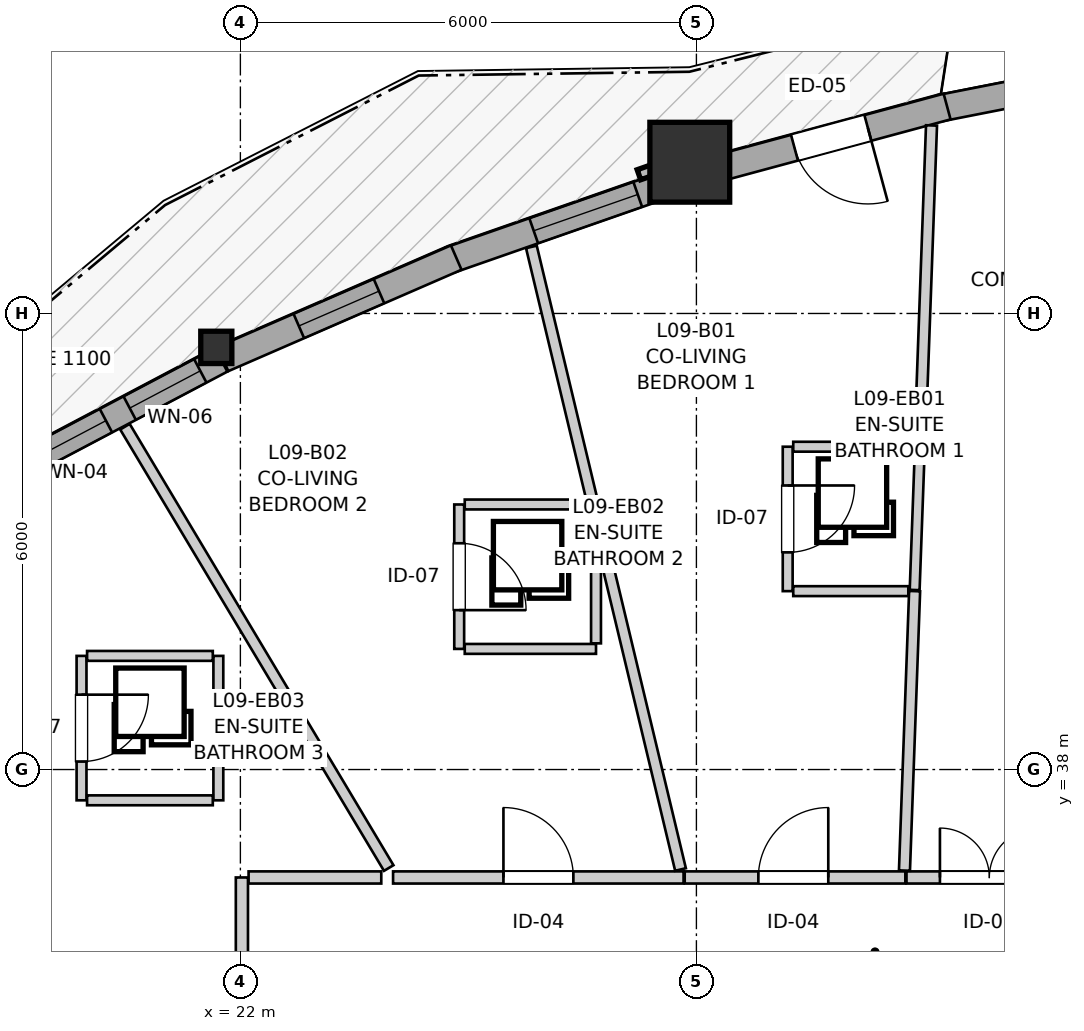
"""IFC4 building model, lengths in metres.
Left out: names, types, materials, properties, quantities, classifications, styles, units other than length and angle.
Written with IfcOpenShell. Run it as: python <this file> out.ifc"""

import sys

from ifc_helpers import new_model, si_unit, direction, frame, frame_2d, origin, origin_2d, place, context, subcontext, project, spatial, rectangle, i_section, extrude, source, transform, mapped, element, fill, save


model = new_model("IFC4")
c1 = context("Model", 3, precision=1e-05, world=origin(), true_north=direction((0.0, 1.0)))
c2 = subcontext(c1, "Body", "Model", "MODEL_VIEW")
j1 = project(units=[si_unit("LENGTHUNIT", "METRE"), si_unit("PLANEANGLEUNIT", "RADIAN")], contexts=[c1])
p1 = place(None, origin())
s1 = spatial("IfcSite", under=j1, at=p1, CompositionType="ELEMENT")
p2 = place(p1, origin())
s2 = spatial("IfcBuilding", under=s1, at=p2, CompositionType="ELEMENT")
p3 = place(p2, frame((0.0, 0.0, 33.4)))
s3 = spatial("IfcBuildingStorey", under=s2, at=p3, CompositionType="ELEMENT", Elevation=33.4)
m1 = source(origin(), c2, "Body", "SweptSolid", [
    extrude(rectangle(XDim=1.05, YDim=1.05, at=origin_2d()), origin(), (0.0, 0.0, 1.0), 2.94),
])
p4 = place(p3, frame((27.913, 45.99, 0.0), z_axis=(0.0, 0.0, 1.0), x_axis=(1.0, 0.0, 0.0)))
e1 = element("IfcColumn", 1, at=p4, inside=s3, PredefinedType="COLUMN", context=c2, shape_type="MappedRepresentation", body=[
    mapped(m1, transform((0.0, 0.0, 0.0), x_axis=(1.0, 0.0, 0.0), y_axis=(0.0, 1.0, 0.0), z_axis=(0.0, 0.0, 1.0), scale=1.0)),
])
m2 = source(origin(), c2, "Body", "SweptSolid", [
    extrude(i_section(OverallWidth=0.409, OverallDepth=0.425, WebThickness=0.03, FlangeThickness=0.048, FilletRadius=0.015, at=origin_2d()), origin(), (0.0, 0.0, 1.0), 2.94),
])
p5 = place(p3, frame((21.683, 43.554, 0.0), z_axis=(0.0, 0.0, 1.0), x_axis=(1.0, 0.0, 0.0)))
e2 = element("IfcColumn", 2, at=p5, inside=s3, PredefinedType="PILASTER", context=c2, shape_type="MappedRepresentation", body=[
    mapped(m2, transform((0.0, 0.0, 0.0), x_axis=(1.0, 0.0, 0.0), y_axis=(0.0, 1.0, 0.0), z_axis=(0.0, 0.0, 1.0), scale=1.0)),
])
p6 = place(p3, frame((34.659, 47.38, 0.0), z_axis=(0.0, 0.0, 1.0), x_axis=(-0.981222284826, -0.19288034571, 0.0)))
e3 = element("IfcWall", 3, at=p6, inside=s3, PredefinedType="SOLIDWALL", context=c2, shape_type="SweptSolid", body=[
    extrude(rectangle(XDim=3.512, YDim=0.35, at=frame_2d((1.756, 0.0))), origin(), (0.0, 0.0, 1.0), 2.42),
])
p7 = place(p6, frame((1.021, 0.0, 0.82)))
e4 = element("IfcOpeningElement", 4, at=p7, cuts=e3, PredefinedType="OPENING", context=c2, shape_type="SweptSolid", body=[
    extrude(rectangle(XDim=1.45, YDim=1.25, at=frame_2d((0.725, 0.625))), frame((0.0, 0.185, 0.0), z_axis=(0.0, -1.0, 0.0), x_axis=(1.0, 0.0, 0.0)), (0.0, 0.0, 1.0), 0.37),
])
p8 = place(p3, frame((31.298, 46.722, 0.0), z_axis=(0.0, 0.0, 1.0), x_axis=(-0.965455913242, -0.260566459057, 0.0)))
e5 = element("IfcWall", 5, at=p8, inside=s3, PredefinedType="SOLIDWALL", context=c2, shape_type="SweptSolid", body=[
    extrude(rectangle(XDim=3.159, YDim=0.35, at=frame_2d((1.58, 0.0))), origin(), (0.0, 0.0, 1.0), 2.42),
])
p9 = place(p8, frame((1.08, 0.0, 0.0)))
e6 = element("IfcOpeningElement", 6, at=p9, cuts=e5, PredefinedType="OPENING", context=c2, shape_type="SweptSolid", body=[
    extrude(rectangle(XDim=1.0, YDim=2.1, at=frame_2d((0.5, 1.05))), frame((0.0, 0.185, 0.0), z_axis=(0.0, -1.0, 0.0), x_axis=(1.0, 0.0, 0.0)), (0.0, 0.0, 1.0), 0.37),
])
p10 = place(p3, frame((27.687, 45.726, 0.0), z_axis=(0.0, 0.0, 1.0), x_axis=(-0.9441205041, -0.329600475936, 0.0)))
e7 = element("IfcWall", 7, at=p10, inside=s3, PredefinedType="SOLIDWALL", context=c2, shape_type="SweptSolid", body=[
    extrude(rectangle(XDim=3.104, YDim=0.35, at=frame_2d((1.552, 0.0))), origin(), (0.0, 0.0, 1.0), 2.42),
])
p11 = place(p10, frame((0.486, 0.0, 0.82)))
e8 = element("IfcOpeningElement", 8, at=p11, cuts=e7, PredefinedType="OPENING", context=c2, shape_type="SweptSolid", body=[
    extrude(rectangle(XDim=1.45, YDim=1.25, at=frame_2d((0.725, 0.625))), frame((0.0, 0.185, 0.0), z_axis=(0.0, -1.0, 0.0), x_axis=(1.0, 0.0, 0.0)), (0.0, 0.0, 1.0), 0.37),
])
p12 = place(p3, frame((24.84, 44.735, 0.0), z_axis=(0.0, 0.0, 1.0), x_axis=(-0.917090935142, -0.398678086532, 0.0)))
e9 = element("IfcWall", 9, at=p12, inside=s3, PredefinedType="SOLIDWALL", context=c2, shape_type="SweptSolid", body=[
    extrude(rectangle(XDim=3.346, YDim=0.35, at=frame_2d((1.673, 0.0))), origin(), (0.0, 0.0, 1.0), 2.42),
])
p13 = place(p12, frame((1.108, 0.0, 0.82)))
e10 = element("IfcOpeningElement", 10, at=p13, cuts=e9, PredefinedType="OPENING", context=c2, shape_type="SweptSolid", body=[
    extrude(rectangle(XDim=1.15, YDim=1.2, at=frame_2d((0.575, 0.6))), frame((0.0, 0.185, 0.0), z_axis=(0.0, -1.0, 0.0), x_axis=(1.0, 0.0, 0.0)), (0.0, 0.0, 1.0), 0.37),
])
p14 = place(p3, frame((21.747, 43.39, 0.0), z_axis=(0.0, 0.0, 1.0), x_axis=(-0.88437802144, -0.46677137358, 0.0)))
e11 = element("IfcWall", 11, at=p14, inside=s3, PredefinedType="SOLIDWALL", context=c2, shape_type="SweptSolid", body=[
    extrude(rectangle(XDim=3.327, YDim=0.35, at=frame_2d((1.664, 0.0))), origin(), (0.0, 0.0, 1.0), 2.42),
])
p15 = place(p14, frame((0.311, 0.0, 0.82)))
e12 = element("IfcOpeningElement", 12, at=p15, cuts=e11, PredefinedType="OPENING", context=c2, shape_type="SweptSolid", body=[
    extrude(rectangle(XDim=1.05, YDim=1.45, at=frame_2d((0.525, 0.725))), frame((0.0, 0.185, 0.0), z_axis=(0.0, -1.0, 0.0), x_axis=(1.0, 0.0, 0.0)), (0.0, 0.0, 1.0), 0.37),
])
p16 = place(p14, frame((1.714, 0.0, 0.82)))
e13 = element("IfcOpeningElement", 13, at=p16, cuts=e11, PredefinedType="OPENING", context=c2, shape_type="SweptSolid", body=[
    extrude(rectangle(XDim=1.35, YDim=1.45, at=frame_2d((0.675, 0.725))), frame((0.0, 0.185, 0.0), z_axis=(0.0, -1.0, 0.0), x_axis=(1.0, 0.0, 0.0)), (0.0, 0.0, 1.0), 0.37),
])
p17 = place(p3, frame((22.02, 32.71, 0.0), z_axis=(0.0, 0.0, 1.0), x_axis=(0.0, 1.0, 0.0)))
e14 = element("IfcWall", 14, at=p17, inside=s3, PredefinedType="PARTITIONING", context=c2, shape_type="SweptSolid", body=[
    extrude(rectangle(XDim=3.87, YDim=0.16, at=frame_2d((1.935, 0.0))), origin(), (0.0, 0.0, 1.0), 2.94),
])
p18 = place(p17, frame((1.485, 0.0, 0.0)))
e15 = element("IfcOpeningElement", 15, at=p18, cuts=e14, PredefinedType="OPENING", context=c2, shape_type="SweptSolid", body=[
    extrude(rectangle(XDim=0.92, YDim=2.1, at=frame_2d((0.46, 1.05))), frame((0.0, 0.09, 0.0), z_axis=(0.0, -1.0, 0.0), x_axis=(1.0, 0.0, 0.0)), (0.0, 0.0, 1.0), 0.18),
])
p19 = place(p3, frame((24.009, 36.58, 0.0), z_axis=(0.0, 0.0, 1.0), x_axis=(1.0, 0.0, 0.0)))
e16 = element("IfcWall", 16, at=p19, inside=s3, PredefinedType="PARTITIONING", context=c2, shape_type="SweptSolid", body=[
    extrude(rectangle(XDim=3.822, YDim=0.16, at=frame_2d((1.911, 0.0))), origin(), (0.0, 0.0, 1.0), 2.548),
])
p20 = place(p19, frame((1.452, 0.0, 0.0)))
e17 = element("IfcOpeningElement", 17, at=p20, cuts=e16, PredefinedType="OPENING", context=c2, shape_type="SweptSolid", body=[
    extrude(rectangle(XDim=0.92, YDim=2.1, at=frame_2d((0.46, 1.05))), frame((0.0, 0.09, 0.0), z_axis=(0.0, -1.0, 0.0), x_axis=(1.0, 0.0, 0.0)), (0.0, 0.0, 1.0), 0.18),
])
p21 = place(p3, frame((27.846, 36.58, 0.0), z_axis=(0.0, 0.0, 1.0), x_axis=(1.0, 0.0, 0.0)))
e18 = element("IfcWall", 18, at=p21, inside=s3, PredefinedType="PARTITIONING", context=c2, shape_type="SweptSolid", body=[
    extrude(rectangle(XDim=2.903, YDim=0.16, at=frame_2d((1.452, 0.0))), origin(), (0.0, 0.0, 1.0), 2.94),
])
p22 = place(p21, frame((0.969, 0.0, 0.0)))
e19 = element("IfcOpeningElement", 19, at=p22, cuts=e18, PredefinedType="OPENING", context=c2, shape_type="SweptSolid", body=[
    extrude(rectangle(XDim=0.92, YDim=2.1, at=frame_2d((0.46, 1.05))), frame((0.0, 0.09, 0.0), z_axis=(0.0, -1.0, 0.0), x_axis=(1.0, 0.0, 0.0)), (0.0, 0.0, 1.0), 0.18),
])
p23 = place(p3, frame((30.764, 36.58, 0.0), z_axis=(0.0, 0.0, 1.0), x_axis=(1.0, 0.0, 0.0)))
e20 = element("IfcWall", 20, at=p23, inside=s3, PredefinedType="PARTITIONING", context=c2, shape_type="SweptSolid", body=[
    extrude(rectangle(XDim=2.225, YDim=0.16, at=frame_2d((1.113, 0.0))), origin(), (0.0, 0.0, 1.0), 2.94),
])
p24 = place(p23, frame((0.44, 0.0, 0.0)))
e21 = element("IfcOpeningElement", 21, at=p24, cuts=e20, PredefinedType="OPENING", context=c2, shape_type="SweptSolid", body=[
    extrude(rectangle(XDim=1.3, YDim=2.1, at=frame_2d((0.65, 1.05))), frame((0.0, 0.09, 0.0), z_axis=(0.0, -1.0, 0.0), x_axis=(1.0, 0.0, 0.0)), (0.0, 0.0, 1.0), 0.18),
])
p25 = place(p3, frame((29.201, 42.247, 0.0), z_axis=(0.0, 0.0, 1.0), x_axis=(0.0, -1.0, 0.0)))
e22 = element("IfcWall", 22, at=p25, inside=s3, PredefinedType="PARTITIONING", context=c2, shape_type="SweptSolid", body=[
    extrude(rectangle(XDim=1.9, YDim=0.13, at=frame_2d((0.95, 0.0))), origin(), (0.0, 0.0, 1.0), 2.94),
])
p26 = place(p25, frame((0.51, 0.0, 0.0)))
e23 = element("IfcOpeningElement", 23, at=p26, cuts=e22, PredefinedType="OPENING", context=c2, shape_type="SweptSolid", body=[
    extrude(rectangle(XDim=0.88, YDim=2.05, at=frame_2d((0.44, 1.025))), frame((0.0, 0.075, 0.0), z_axis=(0.0, -1.0, 0.0), x_axis=(1.0, 0.0, 0.0)), (0.0, 0.0, 1.0), 0.15),
])
p27 = place(p3, frame((24.879, 41.487, 0.0), z_axis=(0.0, 0.0, 1.0), x_axis=(0.0, -1.0, 0.0)))
e24 = element("IfcWall", 24, at=p27, inside=s3, PredefinedType="PARTITIONING", context=c2, shape_type="SweptSolid", body=[
    extrude(rectangle(XDim=1.9, YDim=0.13, at=frame_2d((0.95, 0.0))), origin(), (0.0, 0.0, 1.0), 2.94),
])
p28 = place(p27, frame((0.51, 0.0, 0.0)))
e25 = element("IfcOpeningElement", 25, at=p28, cuts=e24, PredefinedType="OPENING", context=c2, shape_type="SweptSolid", body=[
    extrude(rectangle(XDim=0.88, YDim=2.05, at=frame_2d((0.44, 1.025))), frame((0.0, 0.075, 0.0), z_axis=(0.0, -1.0, 0.0), x_axis=(1.0, 0.0, 0.0)), (0.0, 0.0, 1.0), 0.15),
])
p29 = place(p3, frame((19.91, 39.495, 0.0), z_axis=(0.0, 0.0, 1.0), x_axis=(0.0, -1.0, 0.0)))
e26 = element("IfcWall", 26, at=p29, inside=s3, PredefinedType="PARTITIONING", context=c2, shape_type="SweptSolid", body=[
    extrude(rectangle(XDim=1.9, YDim=0.13, at=frame_2d((0.95, 0.0))), origin(), (0.0, 0.0, 1.0), 2.94),
])
p30 = place(p29, frame((0.51, 0.0, 0.0)))
e27 = element("IfcOpeningElement", 27, at=p30, cuts=e26, PredefinedType="OPENING", context=c2, shape_type="SweptSolid", body=[
    extrude(rectangle(XDim=0.88, YDim=2.05, at=frame_2d((0.44, 1.025))), frame((0.0, 0.075, 0.0), z_axis=(0.0, -1.0, 0.0), x_axis=(1.0, 0.0, 0.0)), (0.0, 0.0, 1.0), 0.15),
])
p31 = place(p3, frame((11.92, 36.618, 0.0), z_axis=(0.0, 0.0, 1.0), x_axis=(0.866473494239, -0.499223080177, 0.0)))
e28 = element("IfcWall", 28, at=p31, inside=s3, PredefinedType="PARTITIONING", context=c2, shape_type="SweptSolid", body=[
    extrude(rectangle(XDim=11.514, YDim=0.145, at=frame_2d((5.757, 0.0))), origin(), (0.0, 0.0, 1.0), 2.94),
])
p32 = place(p3, frame((14.566, 38.751, 0.0), z_axis=(0.0, 0.0, 1.0), x_axis=(0.777881688073, -0.628410756879, 0.0)))
e29 = element("IfcWall", 29, at=p32, inside=s3, PredefinedType="PARTITIONING", context=c2, shape_type="SweptSolid", body=[
    extrude(rectangle(XDim=9.413, YDim=0.145, at=frame_2d((4.707, 0.0))), origin(), (0.0, 0.0, 1.0), 2.94),
])
p33 = place(p3, frame((20.481, 42.51, 0.0), z_axis=(0.0, 0.0, 1.0), x_axis=(0.513067331262, -0.858348363773, 0.0)))
e30 = element("IfcWall", 30, at=p33, inside=s3, PredefinedType="PARTITIONING", context=c2, shape_type="SweptSolid", body=[
    extrude(rectangle(XDim=6.765, YDim=0.145, at=frame_2d((3.382, 0.0))), origin(), (0.0, 0.0, 1.0), 2.94),
])
p34 = place(p3, frame((26.664, 41.388, 0.0), z_axis=(0.0, 0.0, 1.0), x_axis=(0.233021630241, -0.972471552201, 0.0)))
e31 = element("IfcWall", 31, at=p34, inside=s3, PredefinedType="PARTITIONING", context=c2, shape_type="SweptSolid", body=[
    extrude(rectangle(XDim=4.836, YDim=0.145, at=frame_2d((2.418, 0.0))), origin(), (0.0, 0.0, 1.0), 2.94),
])
p35 = place(p3, frame((30.94, 42.247, 0.0), z_axis=(0.0, 0.0, 1.0), x_axis=(0.03624948077, 0.999342771597, 0.0)))
e32 = element("IfcWall", 32, at=p35, inside=s3, PredefinedType="PARTITIONING", context=c2, shape_type="SweptSolid", body=[
    extrude(rectangle(XDim=4.229, YDim=0.145, at=frame_2d((2.115, 0.0))), origin(), (0.0, 0.0, 1.0), 2.94),
])
p36 = place(p3, frame((30.737, 36.671, 0.0), z_axis=(0.0, 0.0, 1.0), x_axis=(0.036368539535, 0.999338445839, 0.0)))
e33 = element("IfcWall", 33, at=p36, inside=s3, PredefinedType="PARTITIONING", context=c2, shape_type="SweptSolid", body=[
    extrude(rectangle(XDim=3.679, YDim=0.145, at=frame_2d((1.839, 0.0))), origin(), (0.0, 0.0, 1.0), 2.94),
])
p37 = place(p3, frame((25.829, 44.875, 0.0), z_axis=(0.0, 0.0, 1.0), x_axis=(0.232921769711, -0.972495475154, 0.0)))
e34 = element("IfcWall", 34, at=p37, inside=s3, PredefinedType="PARTITIONING", context=c2, shape_type="SweptSolid", body=[
    extrude(rectangle(XDim=3.5, YDim=0.145, at=frame_2d((1.75, 0.0))), origin(), (0.0, 0.0, 1.0), 2.94),
])
p38 = place(p3, frame((22.108, 36.58, 0.0), z_axis=(0.0, 0.0, 1.0), x_axis=(1.0, 0.0, 0.0)))
e35 = element("IfcWall", 35, at=p38, inside=s3, PredefinedType="PARTITIONING", context=c2, shape_type="SweptSolid", body=[
    extrude(rectangle(XDim=1.746, YDim=0.16, at=frame_2d((0.873, 0.0))), origin(), (0.0, 0.0, 1.0), 2.548),
])
p39 = place(p3, frame((21.71, 37.595, 0.0), z_axis=(0.0, 0.0, 1.0), x_axis=(0.0, 1.0, 0.0)))
e36 = element("IfcWall", 36, at=p39, inside=s3, PredefinedType="PARTITIONING", context=c2, shape_type="SweptSolid", body=[
    extrude(rectangle(XDim=1.9, YDim=0.13, at=frame_2d((0.95, 0.0))), origin(), (0.0, 0.0, 1.0), 2.94),
])
p40 = place(p3, frame((30.872, 40.362, 0.0), z_axis=(0.0, 0.0, 1.0), x_axis=(0.036273279858, 0.999341908042, 0.0)))
e37 = element("IfcWall", 37, at=p40, inside=s3, PredefinedType="PARTITIONING", context=c2, shape_type="SweptSolid", body=[
    extrude(rectangle(XDim=1.871, YDim=0.13, at=frame_2d((0.936, 0.0))), origin(), (0.0, 0.0, 1.0), 2.94),
])
for number, where, z_axis, x_axis in (
    (38, (19.983, 39.495, 0.0), (0.0, 0.0, 1.0), (1.0, 0.0, 0.0)),
    (39, (19.983, 37.595, 0.0), (0.0, 0.0, 1.0), (1.0, 0.0, 0.0)),
):
    element("IfcWall", number, at=place(p3, frame(where, z_axis=z_axis, x_axis=x_axis)), inside=s3, PredefinedType="PARTITIONING", context=c2, shape_type="SweptSolid", body=[
        extrude(rectangle(XDim=1.654, YDim=0.13, at=frame_2d((0.827, 0.0))), origin(), (0.0, 0.0, 1.0), 2.94),
    ])
p41 = place(p3, frame((24.952, 39.587, 0.0), z_axis=(0.0, 0.0, 1.0), x_axis=(1.0, 0.0, 0.0)))
e40 = element("IfcWall", 40, at=p41, inside=s3, PredefinedType="PARTITIONING", context=c2, shape_type="SweptSolid", body=[
    extrude(rectangle(XDim=1.727, YDim=0.13, at=frame_2d((0.864, 0.0))), origin(), (0.0, 0.0, 1.0), 2.94),
])
p42 = place(p3, frame((24.952, 41.487, 0.0), z_axis=(0.0, 0.0, 1.0), x_axis=(1.0, 0.0, 0.0)))
e41 = element("IfcWall", 41, at=p42, inside=s3, PredefinedType="PARTITIONING", context=c2, shape_type="SweptSolid", body=[
    extrude(rectangle(XDim=1.59, YDim=0.13, at=frame_2d((0.795, 0.0))), origin(), (0.0, 0.0, 1.0), 2.508),
])
p43 = place(p3, frame((29.274, 42.247, 0.0), z_axis=(0.0, 0.0, 1.0), x_axis=(1.0, 0.0, 0.0)))
e42 = element("IfcWall", 42, at=p43, inside=s3, PredefinedType="PARTITIONING", context=c2, shape_type="SweptSolid", body=[
    extrude(rectangle(XDim=1.583, YDim=0.13, at=frame_2d((0.792, 0.0))), origin(), (0.0, 0.0, 1.0), 2.508),
])
p44 = place(p3, frame((26.679, 39.66, 0.0), z_axis=(0.0, 0.0, 1.0), x_axis=(0.0, 1.0, 0.0)))
e43 = element("IfcWall", 43, at=p44, inside=s3, PredefinedType="PARTITIONING", context=c2, shape_type="SweptSolid", body=[
    extrude(rectangle(XDim=1.38, YDim=0.13, at=frame_2d((0.69, 0.0))), origin(), (0.0, 0.0, 1.0), 2.94),
])
p45 = place(p3, frame((29.274, 40.347, 0.0), z_axis=(0.0, 0.0, 1.0), x_axis=(1.0, 0.0, 0.0)))
e44 = element("IfcWall", 44, at=p45, inside=s3, PredefinedType="PARTITIONING", context=c2, shape_type="SweptSolid", body=[
    extrude(rectangle(XDim=1.514, YDim=0.13, at=frame_2d((0.757, 0.0))), origin(), (0.0, 0.0, 1.0), 2.94),
])
m3 = source(origin(), c2, "Body", "SweptSolid", [
    extrude(rectangle(XDim=1.45, YDim=1.25, at=frame_2d((0.725, 0.625))), frame((0.0, 0.03, 0.0), z_axis=(0.0, -1.0, 0.0), x_axis=(1.0, 0.0, 0.0)), (0.0, 0.0, 1.0), 0.06),
])
p46 = place(p11, origin())
e45 = element("IfcWindow", 45, at=p46, inside=s3, PartitioningType="SINGLE_PANEL", PredefinedType="WINDOW", context=c2, shape_type="MappedRepresentation", body=[
    mapped(m3, transform((0.0, 0.0, 0.0), x_axis=(1.0, 0.0, 0.0), y_axis=(0.0, 1.0, 0.0), z_axis=(0.0, 0.0, 1.0), scale=1.0)),
])
fill(e8, e45)
m4 = source(origin(), c2, "Body", "SweptSolid", [
    extrude(rectangle(XDim=1.15, YDim=1.2, at=frame_2d((0.575, 0.6))), frame((0.0, 0.03, 0.0), z_axis=(0.0, -1.0, 0.0), x_axis=(1.0, 0.0, 0.0)), (0.0, 0.0, 1.0), 0.06),
])
p47 = place(p13, origin())
e46 = element("IfcWindow", 46, at=p47, inside=s3, PartitioningType="SINGLE_PANEL", PredefinedType="WINDOW", context=c2, shape_type="MappedRepresentation", body=[
    mapped(m4, transform((0.0, 0.0, 0.0), x_axis=(1.0, 0.0, 0.0), y_axis=(0.0, 1.0, 0.0), z_axis=(0.0, 0.0, 1.0), scale=1.0)),
])
fill(e10, e46)
m5 = source(origin(), c2, "Body", "SweptSolid", [
    extrude(rectangle(XDim=1.05, YDim=1.45, at=frame_2d((0.525, 0.725))), frame((0.0, 0.03, 0.0), z_axis=(0.0, -1.0, 0.0), x_axis=(1.0, 0.0, 0.0)), (0.0, 0.0, 1.0), 0.06),
])
p48 = place(p15, origin())
e47 = element("IfcWindow", 47, at=p48, inside=s3, PartitioningType="SINGLE_PANEL", PredefinedType="WINDOW", context=c2, shape_type="MappedRepresentation", body=[
    mapped(m5, transform((0.0, 0.0, 0.0), x_axis=(1.0, 0.0, 0.0), y_axis=(0.0, 1.0, 0.0), z_axis=(0.0, 0.0, 1.0), scale=1.0)),
])
fill(e12, e47)
m6 = source(origin(), c2, "Body", "SweptSolid", [
    extrude(rectangle(XDim=1.35, YDim=1.45, at=frame_2d((0.675, 0.725))), frame((0.0, 0.03, 0.0), z_axis=(0.0, -1.0, 0.0), x_axis=(1.0, 0.0, 0.0)), (0.0, 0.0, 1.0), 0.06),
])
p49 = place(p16, origin())
e48 = element("IfcWindow", 48, at=p49, inside=s3, PartitioningType="SINGLE_PANEL", PredefinedType="WINDOW", context=c2, shape_type="MappedRepresentation", body=[
    mapped(m6, transform((0.0, 0.0, 0.0), x_axis=(1.0, 0.0, 0.0), y_axis=(0.0, 1.0, 0.0), z_axis=(0.0, 0.0, 1.0), scale=1.0)),
])
fill(e13, e48)
m7 = source(origin(), c2, "Body", "SweptSolid", [
    extrude(rectangle(XDim=1.0, YDim=2.1, at=frame_2d((0.5, 1.05))), frame((0.0, 0.025, 0.0), z_axis=(0.0, -1.0, 0.0), x_axis=(1.0, 0.0, 0.0)), (0.0, 0.0, 1.0), 0.05),
])
p50 = place(p9, origin())
e49 = element("IfcDoor", 49, at=p50, inside=s3, OperationType="SINGLE_SWING_LEFT", PredefinedType="DOOR", context=c2, shape_type="MappedRepresentation", body=[
    mapped(m7, transform((0.0, 0.0, 0.0), x_axis=(1.0, 0.0, 0.0), y_axis=(0.0, 1.0, 0.0), z_axis=(0.0, 0.0, 1.0), scale=1.0)),
])
fill(e6, e49)
m8 = source(origin(), c2, "Body", "SweptSolid", [
    extrude(rectangle(XDim=0.92, YDim=2.1, at=frame_2d((0.46, 1.05))), frame((0.0, 0.025, 0.0), z_axis=(0.0, -1.0, 0.0), x_axis=(1.0, 0.0, 0.0)), (0.0, 0.0, 1.0), 0.05),
])
p51 = place(p20, origin())
e50 = element("IfcDoor", 50, at=p51, inside=s3, OperationType="SINGLE_SWING_LEFT", PredefinedType="DOOR", context=c2, shape_type="MappedRepresentation", body=[
    mapped(m8, transform((0.0, 0.0, 0.0), x_axis=(1.0, 0.0, 0.0), y_axis=(0.0, 1.0, 0.0), z_axis=(0.0, 0.0, 1.0), scale=1.0)),
])
fill(e17, e50)
p52 = place(p22, origin())
e51 = element("IfcDoor", 51, at=p52, inside=s3, OperationType="SINGLE_SWING_RIGHT", PredefinedType="DOOR", context=c2, shape_type="MappedRepresentation", body=[
    mapped(m8, transform((0.0, 0.0, 0.0), x_axis=(1.0, 0.0, 0.0), y_axis=(0.0, 1.0, 0.0), z_axis=(0.0, 0.0, 1.0), scale=1.0)),
])
fill(e19, e51)
m9 = source(origin(), c2, "Body", "SweptSolid", [
    extrude(rectangle(XDim=1.3, YDim=2.1, at=frame_2d((0.65, 1.05))), frame((0.0, 0.025, 0.0), z_axis=(0.0, -1.0, 0.0), x_axis=(1.0, 0.0, 0.0)), (0.0, 0.0, 1.0), 0.05),
])
p53 = place(p24, origin())
e52 = element("IfcDoor", 52, at=p53, inside=s3, OperationType="DOUBLE_DOOR_SINGLE_SWING", PredefinedType="DOOR", context=c2, shape_type="MappedRepresentation", body=[
    mapped(m9, transform((0.0, 0.0, 0.0), x_axis=(1.0, 0.0, 0.0), y_axis=(0.0, 1.0, 0.0), z_axis=(0.0, 0.0, 1.0), scale=1.0)),
])
fill(e21, e52)
m10 = source(origin(), c2, "Body", "SweptSolid", [
    extrude(rectangle(XDim=0.88, YDim=2.05, at=frame_2d((0.44, 1.025))), frame((0.0, 0.025, 0.0), z_axis=(0.0, -1.0, 0.0), x_axis=(1.0, 0.0, 0.0)), (0.0, 0.0, 1.0), 0.05),
])
p54 = place(p26, origin())
e53 = element("IfcDoor", 53, at=p54, inside=s3, OperationType="SINGLE_SWING_LEFT", PredefinedType="DOOR", context=c2, shape_type="MappedRepresentation", body=[
    mapped(m10, transform((0.0, 0.0, 0.0), x_axis=(1.0, 0.0, 0.0), y_axis=(0.0, 1.0, 0.0), z_axis=(0.0, 0.0, 1.0), scale=1.0)),
])
fill(e23, e53)
p55 = place(p28, origin())
e54 = element("IfcDoor", 54, at=p55, inside=s3, OperationType="SINGLE_SWING_RIGHT", PredefinedType="DOOR", context=c2, shape_type="MappedRepresentation", body=[
    mapped(m10, transform((0.0, 0.0, 0.0), x_axis=(1.0, 0.0, 0.0), y_axis=(0.0, 1.0, 0.0), z_axis=(0.0, 0.0, 1.0), scale=1.0)),
])
fill(e25, e54)
p56 = place(p30, origin())
e55 = element("IfcDoor", 55, at=p56, inside=s3, OperationType="SINGLE_SWING_LEFT", PredefinedType="DOOR", context=c2, shape_type="MappedRepresentation", body=[
    mapped(m10, transform((0.0, 0.0, 0.0), x_axis=(1.0, 0.0, 0.0), y_axis=(0.0, 1.0, 0.0), z_axis=(0.0, 0.0, 1.0), scale=1.0)),
])
fill(e27, e55)
save(model, sys.argv[1])
